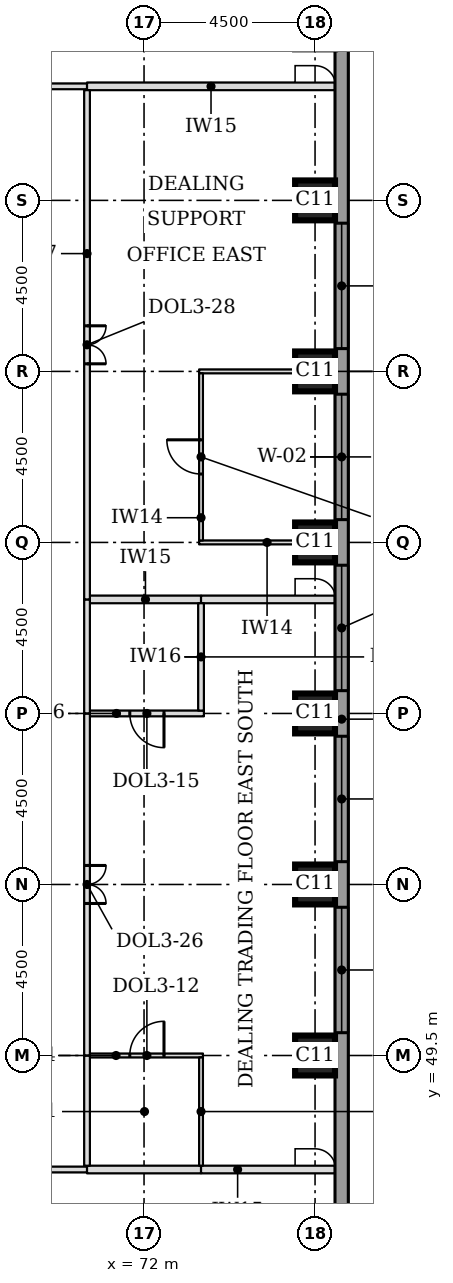
"""IFC4 building model, lengths in metres.
Left out: names, types, materials, properties, quantities, classifications, styles, units other than length and angle.
Written with IfcOpenShell. Run it as: python <this file> out.ifc"""

import sys

from ifc_helpers import new_model, si_unit, direction, frame, frame_2d, origin, origin_2d, place, context, subcontext, project, spatial, rectangle, extrude, element, fill, save


model = new_model("IFC4")
c1 = context("Model", 3, precision=1e-05, world=origin(), true_north=direction((0.0, 1.0)))
c2 = subcontext(c1, "Body", "Model", "MODEL_VIEW")
j1 = project(units=[si_unit("LENGTHUNIT", "METRE"), si_unit("PLANEANGLEUNIT", "RADIAN")], contexts=[c1])
p1 = place(None, origin())
s1 = spatial("IfcSite", under=j1, at=p1, CompositionType="ELEMENT")
p2 = place(p1, origin())
s2 = spatial("IfcBuilding", under=s1, at=p2, CompositionType="ELEMENT")
p3 = place(p2, frame((0.0, 0.0, 93.7)))
s3 = spatial("IfcBuildingStorey", under=s2, at=p3, CompositionType="ELEMENT", Elevation=93.7)
for number, where, z_axis, x_axis in (
    (1, (76.5, 49.5, 0.0), (0.0, 0.0, 1.0), (1.0, 0.0, 0.0)),
    (2, (76.5, 54.0, 0.0), (0.0, 0.0, 1.0), (1.0, 0.0, 0.0)),
    (3, (76.5, 58.5, 0.0), (0.0, 0.0, 1.0), (1.0, 0.0, 0.0)),
    (4, (76.5, 63.0, 0.0), (0.0, 0.0, 1.0), (1.0, 0.0, 0.0)),
    (5, (76.5, 67.5, 0.0), (0.0, 0.0, 1.0), (1.0, 0.0, 0.0)),
    (6, (76.5, 72.0, 0.0), (0.0, 0.0, 1.0), (1.0, 0.0, 0.0)),
):
    element("IfcColumn", number, at=place(p3, frame(where, z_axis=z_axis, x_axis=x_axis)), inside=s3, PredefinedType="COLUMN", context=c2, shape_type="SweptSolid", body=[
        extrude(rectangle(XDim=1.05, YDim=1.05, at=origin_2d()), origin(), (0.0, 0.0, 1.0), 3.7),
    ])
p4 = place(p3, frame((77.2, 44.638, 0.0), z_axis=(0.0, 0.0, 1.0), x_axis=(0.0, 1.0, 0.0)))
e7 = element("IfcWall", 7, at=p4, inside=s3, PredefinedType="STANDARD", context=c2, shape_type="SweptSolid", body=[
    extrude(rectangle(XDim=32.225, YDim=0.35, at=frame_2d((16.112, 0.0))), origin(), (0.0, 0.0, 1.0), 3.525),
])
p5 = place(p4, frame((5.462, 0.0, 0.9)))
e8 = element("IfcOpeningElement", 8, at=p5, cuts=e7, PredefinedType="OPENING", context=c2, shape_type="SweptSolid", body=[
    extrude(rectangle(XDim=3.3, YDim=1.9, at=frame_2d((1.65, 0.95))), frame((0.0, 0.185, 0.0), z_axis=(0.0, -1.0, 0.0), x_axis=(1.0, 0.0, 0.0)), (0.0, 0.0, 1.0), 0.37),
])
p6 = place(p4, frame((9.962, 0.0, 0.9)))
e9 = element("IfcOpeningElement", 9, at=p6, cuts=e7, PredefinedType="OPENING", context=c2, shape_type="SweptSolid", body=[
    extrude(rectangle(XDim=3.3, YDim=1.9, at=frame_2d((1.65, 0.95))), frame((0.0, 0.185, 0.0), z_axis=(0.0, -1.0, 0.0), x_axis=(1.0, 0.0, 0.0)), (0.0, 0.0, 1.0), 0.37),
])
p7 = place(p4, frame((14.462, 0.0, 0.9)))
e10 = element("IfcOpeningElement", 10, at=p7, cuts=e7, PredefinedType="OPENING", context=c2, shape_type="SweptSolid", body=[
    extrude(rectangle(XDim=3.3, YDim=1.9, at=frame_2d((1.65, 0.95))), frame((0.0, 0.185, 0.0), z_axis=(0.0, -1.0, 0.0), x_axis=(1.0, 0.0, 0.0)), (0.0, 0.0, 1.0), 0.37),
])
p8 = place(p4, frame((18.962, 0.0, 0.9)))
e11 = element("IfcOpeningElement", 11, at=p8, cuts=e7, PredefinedType="OPENING", context=c2, shape_type="SweptSolid", body=[
    extrude(rectangle(XDim=3.3, YDim=1.9, at=frame_2d((1.65, 0.95))), frame((0.0, 0.185, 0.0), z_axis=(0.0, -1.0, 0.0), x_axis=(1.0, 0.0, 0.0)), (0.0, 0.0, 1.0), 0.37),
])
p9 = place(p4, frame((23.462, 0.0, 0.9)))
e12 = element("IfcOpeningElement", 12, at=p9, cuts=e7, PredefinedType="OPENING", context=c2, shape_type="SweptSolid", body=[
    extrude(rectangle(XDim=3.3, YDim=1.9, at=frame_2d((1.65, 0.95))), frame((0.0, 0.185, 0.0), z_axis=(0.0, -1.0, 0.0), x_axis=(1.0, 0.0, 0.0)), (0.0, 0.0, 1.0), 0.37),
])
p10 = place(p3, frame((54.0, 46.5, 0.0), z_axis=(0.0, 0.0, 1.0), x_axis=(1.0, 0.0, 0.0)))
e13 = element("IfcWall", 13, at=p10, inside=s3, PredefinedType="PARTITIONING", context=c2, shape_type="SweptSolid", body=[
    extrude(rectangle(XDim=16.5, YDim=0.15, at=frame_2d((8.25, 0.0))), origin(), (0.0, 0.0, 1.0), 3.55),
])
p11 = place(p3, frame((70.5, 46.5, 0.0), z_axis=(0.0, 0.0, 1.0), x_axis=(1.0, 0.0, 0.0)))
e14 = element("IfcWall", 14, at=p11, inside=s3, PredefinedType="PARTITIONING", context=c2, shape_type="SweptSolid", body=[
    extrude(rectangle(XDim=3.0, YDim=0.2, at=frame_2d((1.5, 0.0))), origin(), (0.0, 0.0, 1.0), 3.55),
])
p12 = place(p3, frame((73.5, 46.5, 0.0), z_axis=(0.0, 0.0, 1.0), x_axis=(1.0, 0.0, 0.0)))
e15 = element("IfcWall", 15, at=p12, inside=s3, PredefinedType="PARTITIONING", context=c2, shape_type="SweptSolid", body=[
    extrude(rectangle(XDim=3.525, YDim=0.2, at=frame_2d((1.762, 0.0))), origin(), (0.0, 0.0, 1.0), 3.55),
])
p13 = place(p3, frame((70.575, 49.5, 0.0), z_axis=(0.0, 0.0, 1.0), x_axis=(1.0, 0.0, 0.0)))
e16 = element("IfcWall", 16, at=p13, inside=s3, PredefinedType="PARTITIONING", context=c2, shape_type="SweptSolid", body=[
    extrude(rectangle(XDim=2.975, YDim=0.1, at=frame_2d((1.488, 0.0))), origin(), (0.0, 0.0, 1.0), 3.55),
])
p14 = place(p13, frame((1.05, 0.0, 0.0)))
e17 = element("IfcOpeningElement", 17, at=p14, cuts=e16, PredefinedType="OPENING", context=c2, shape_type="SweptSolid", body=[
    extrude(rectangle(XDim=0.9, YDim=2.1, at=frame_2d((0.45, 1.05))), frame((0.0, 0.06, 0.0), z_axis=(0.0, -1.0, 0.0), x_axis=(1.0, 0.0, 0.0)), (0.0, 0.0, 1.0), 0.12),
])
p15 = place(p3, frame((70.575, 58.5, 0.0), z_axis=(0.0, 0.0, 1.0), x_axis=(1.0, 0.0, 0.0)))
e18 = element("IfcWall", 18, at=p15, inside=s3, PredefinedType="PARTITIONING", context=c2, shape_type="SweptSolid", body=[
    extrude(rectangle(XDim=3.0, YDim=0.15, at=frame_2d((1.5, 0.0))), origin(), (0.0, 0.0, 1.0), 3.55),
])
p16 = place(p15, frame((1.05, 0.0, 0.0)))
e19 = element("IfcOpeningElement", 19, at=p16, cuts=e18, PredefinedType="OPENING", context=c2, shape_type="SweptSolid", body=[
    extrude(rectangle(XDim=0.9, YDim=2.1, at=frame_2d((0.45, 1.05))), frame((0.0, 0.085, 0.0), z_axis=(0.0, -1.0, 0.0), x_axis=(1.0, 0.0, 0.0)), (0.0, 0.0, 1.0), 0.17),
])
p17 = place(p3, frame((70.575, 61.5, 0.0), z_axis=(0.0, 0.0, 1.0), x_axis=(1.0, 0.0, 0.0)))
e20 = element("IfcWall", 20, at=p17, inside=s3, PredefinedType="PARTITIONING", context=c2, shape_type="SweptSolid", body=[
    extrude(rectangle(XDim=2.925, YDim=0.2, at=frame_2d((1.462, 0.0))), origin(), (0.0, 0.0, 1.0), 3.55),
])
p18 = place(p3, frame((73.5, 61.5, 0.0), z_axis=(0.0, 0.0, 1.0), x_axis=(1.0, 0.0, 0.0)))
e21 = element("IfcWall", 21, at=p18, inside=s3, PredefinedType="PARTITIONING", context=c2, shape_type="SweptSolid", body=[
    extrude(rectangle(XDim=3.525, YDim=0.2, at=frame_2d((1.762, 0.0))), origin(), (0.0, 0.0, 1.0), 3.55),
])
for number, where, z_axis, x_axis in (
    (22, (73.45, 63.0, 0.0), (0.0, 0.0, 1.0), (1.0, 0.0, 0.0)),
    (23, (73.45, 67.5, 0.0), (0.0, 0.0, 1.0), (1.0, 0.0, 0.0)),
):
    element("IfcWall", number, at=place(p3, frame(where, z_axis=z_axis, x_axis=x_axis)), inside=s3, PredefinedType="PARTITIONING", context=c2, shape_type="SweptSolid", body=[
        extrude(rectangle(XDim=3.575, YDim=0.1, at=frame_2d((1.788, 0.0))), origin(), (0.0, 0.0, 1.0), 3.55),
    ])
p19 = place(p3, frame((49.5, 75.0, 0.0), z_axis=(0.0, 0.0, 1.0), x_axis=(1.0, 0.0, 0.0)))
e24 = element("IfcWall", 24, at=p19, inside=s3, PredefinedType="PARTITIONING", context=c2, shape_type="SweptSolid", body=[
    extrude(rectangle(XDim=21.0, YDim=0.15, at=frame_2d((10.5, 0.0))), origin(), (0.0, 0.0, 1.0), 3.55),
])
p20 = place(p19, frame((10.0, 0.0, 0.0)))
e25 = element("IfcOpeningElement", 25, at=p20, cuts=e24, PredefinedType="OPENING", context=c2, shape_type="SweptSolid", body=[
    extrude(rectangle(XDim=1.0, YDim=2.1, at=frame_2d((0.5, 1.05))), frame((0.0, 0.085, 0.0), z_axis=(0.0, -1.0, 0.0), x_axis=(1.0, 0.0, 0.0)), (0.0, 0.0, 1.0), 0.17),
])
p21 = place(p3, frame((70.5, 75.0, 0.0), z_axis=(0.0, 0.0, 1.0), x_axis=(1.0, 0.0, 0.0)))
e26 = element("IfcWall", 26, at=p21, inside=s3, PredefinedType="PARTITIONING", context=c2, shape_type="SweptSolid", body=[
    extrude(rectangle(XDim=6.525, YDim=0.2, at=frame_2d((3.262, 0.0))), origin(), (0.0, 0.0, 1.0), 3.55),
])
p22 = place(p3, frame((70.5, 46.6, 0.0), z_axis=(0.0, 0.0, 1.0), x_axis=(0.0, 1.0, 0.0)))
e27 = element("IfcWall", 27, at=p22, inside=s3, PredefinedType="PARTITIONING", context=c2, shape_type="SweptSolid", body=[
    extrude(rectangle(XDim=2.9, YDim=0.15, at=frame_2d((1.45, 0.0))), origin(), (0.0, 0.0, 1.0), 3.55),
])
p23 = place(p3, frame((73.5, 46.6, 0.0), z_axis=(0.0, 0.0, 1.0), x_axis=(0.0, 1.0, 0.0)))
e28 = element("IfcWall", 28, at=p23, inside=s3, PredefinedType="PARTITIONING", context=c2, shape_type="SweptSolid", body=[
    extrude(rectangle(XDim=2.85, YDim=0.1, at=frame_2d((1.425, 0.0))), origin(), (0.0, 0.0, 1.0), 3.55),
])
p24 = place(p3, frame((70.5, 49.5, 0.0), z_axis=(0.0, 0.0, 1.0), x_axis=(0.0, 1.0, 0.0)))
e29 = element("IfcWall", 29, at=p24, inside=s3, PredefinedType="PARTITIONING", context=c2, shape_type="SweptSolid", body=[
    extrude(rectangle(XDim=9.0, YDim=0.15, at=frame_2d((4.5, 0.0))), origin(), (0.0, 0.0, 1.0), 3.55),
])
p25 = place(p24, frame((4.0, 0.0, 0.0)))
e30 = element("IfcOpeningElement", 30, at=p25, cuts=e29, PredefinedType="OPENING", context=c2, shape_type="SweptSolid", body=[
    extrude(rectangle(XDim=1.0, YDim=2.1, at=frame_2d((0.5, 1.05))), frame((0.0, 0.085, 0.0), z_axis=(0.0, -1.0, 0.0), x_axis=(1.0, 0.0, 0.0)), (0.0, 0.0, 1.0), 0.17),
])
p26 = place(p3, frame((70.5, 58.5, 0.0), z_axis=(0.0, 0.0, 1.0), x_axis=(0.0, 1.0, 0.0)))
e31 = element("IfcWall", 31, at=p26, inside=s3, PredefinedType="PARTITIONING", context=c2, shape_type="SweptSolid", body=[
    extrude(rectangle(XDim=3.0, YDim=0.15, at=frame_2d((1.5, 0.0))), origin(), (0.0, 0.0, 1.0), 3.55),
])
p27 = place(p3, frame((73.5, 58.575, 0.0), z_axis=(0.0, 0.0, 1.0), x_axis=(0.0, 1.0, 0.0)))
e32 = element("IfcWall", 32, at=p27, inside=s3, PredefinedType="PARTITIONING", context=c2, shape_type="SweptSolid", body=[
    extrude(rectangle(XDim=2.825, YDim=0.15, at=frame_2d((1.413, 0.0))), origin(), (0.0, 0.0, 1.0), 3.55),
])
p28 = place(p3, frame((70.5, 61.5, 0.0), z_axis=(0.0, 0.0, 1.0), x_axis=(0.0, 1.0, 0.0)))
e33 = element("IfcWall", 33, at=p28, inside=s3, PredefinedType="PARTITIONING", context=c2, shape_type="SweptSolid", body=[
    extrude(rectangle(XDim=13.4, YDim=0.15, at=frame_2d((6.7, 0.0))), origin(), (0.0, 0.0, 1.0), 3.55),
])
p29 = place(p28, frame((6.2, 0.0, 0.0)))
e34 = element("IfcOpeningElement", 34, at=p29, cuts=e33, PredefinedType="OPENING", context=c2, shape_type="SweptSolid", body=[
    extrude(rectangle(XDim=1.0, YDim=2.1, at=frame_2d((0.5, 1.05))), frame((0.0, 0.085, 0.0), z_axis=(0.0, -1.0, 0.0), x_axis=(1.0, 0.0, 0.0)), (0.0, 0.0, 1.0), 0.17),
])
p30 = place(p3, frame((73.5, 63.05, 0.0), z_axis=(0.0, 0.0, 1.0), x_axis=(0.0, 1.0, 0.0)))
e35 = element("IfcWall", 35, at=p30, inside=s3, PredefinedType="PARTITIONING", context=c2, shape_type="SweptSolid", body=[
    extrude(rectangle(XDim=4.4, YDim=0.1, at=frame_2d((2.2, 0.0))), origin(), (0.0, 0.0, 1.0), 3.55),
])
p31 = place(p30, frame((1.75, 0.0, 0.0)))
e36 = element("IfcOpeningElement", 36, at=p31, cuts=e35, PredefinedType="OPENING", context=c2, shape_type="SweptSolid", body=[
    extrude(rectangle(XDim=0.9, YDim=2.1, at=frame_2d((0.45, 1.05))), frame((0.0, 0.06, 0.0), z_axis=(0.0, -1.0, 0.0), x_axis=(1.0, 0.0, 0.0)), (0.0, 0.0, 1.0), 0.12),
])
p32 = place(p5, origin())
e37 = element("IfcWindow", 37, at=p32, inside=s3, PartitioningType="SINGLE_PANEL", PredefinedType="WINDOW", context=c2, shape_type="SweptSolid", body=[
    extrude(rectangle(XDim=3.3, YDim=1.9, at=frame_2d((1.65, 0.95))), frame((0.0, 0.085, 0.0), z_axis=(0.0, -1.0, 0.0), x_axis=(1.0, 0.0, 0.0)), (0.0, 0.0, 1.0), 0.06),
])
fill(e8, e37)
p33 = place(p6, origin())
e38 = element("IfcWindow", 38, at=p33, inside=s3, PartitioningType="SINGLE_PANEL", PredefinedType="WINDOW", context=c2, shape_type="SweptSolid", body=[
    extrude(rectangle(XDim=3.3, YDim=1.9, at=frame_2d((1.65, 0.95))), frame((0.0, 0.085, 0.0), z_axis=(0.0, -1.0, 0.0), x_axis=(1.0, 0.0, 0.0)), (0.0, 0.0, 1.0), 0.06),
])
fill(e9, e38)
p34 = place(p7, origin())
e39 = element("IfcWindow", 39, at=p34, inside=s3, PartitioningType="SINGLE_PANEL", PredefinedType="WINDOW", context=c2, shape_type="SweptSolid", body=[
    extrude(rectangle(XDim=3.3, YDim=1.9, at=frame_2d((1.65, 0.95))), frame((0.0, 0.085, 0.0), z_axis=(0.0, -1.0, 0.0), x_axis=(1.0, 0.0, 0.0)), (0.0, 0.0, 1.0), 0.06),
])
fill(e10, e39)
p35 = place(p8, origin())
e40 = element("IfcWindow", 40, at=p35, inside=s3, PartitioningType="SINGLE_PANEL", PredefinedType="WINDOW", context=c2, shape_type="SweptSolid", body=[
    extrude(rectangle(XDim=3.3, YDim=1.9, at=frame_2d((1.65, 0.95))), frame((0.0, 0.085, 0.0), z_axis=(0.0, -1.0, 0.0), x_axis=(1.0, 0.0, 0.0)), (0.0, 0.0, 1.0), 0.06),
])
fill(e11, e40)
p36 = place(p9, origin())
e41 = element("IfcWindow", 41, at=p36, inside=s3, PartitioningType="SINGLE_PANEL", PredefinedType="WINDOW", context=c2, shape_type="SweptSolid", body=[
    extrude(rectangle(XDim=3.3, YDim=1.9, at=frame_2d((1.65, 0.95))), frame((0.0, 0.085, 0.0), z_axis=(0.0, -1.0, 0.0), x_axis=(1.0, 0.0, 0.0)), (0.0, 0.0, 1.0), 0.06),
])
fill(e12, e41)
p37 = place(p25, frame((1.0, 0.0, 0.0), z_axis=(0.0, 0.0, 1.0), x_axis=(-1.0, 0.0, 0.0)))
e42 = element("IfcDoor", 42, at=p37, inside=s3, OperationType="DOUBLE_DOOR_SINGLE_SWING", PredefinedType="DOOR", context=c2, shape_type="SweptSolid", body=[
    extrude(rectangle(XDim=1.0, YDim=2.1, at=frame_2d((0.5, 1.05))), frame((0.0, 0.025, 0.0), z_axis=(0.0, -1.0, 0.0), x_axis=(1.0, 0.0, 0.0)), (0.0, 0.0, 1.0), 0.05),
])
fill(e30, e42)
p38 = place(p16, frame((0.9, 0.0, 0.0), z_axis=(0.0, 0.0, 1.0), x_axis=(-1.0, 0.0, 0.0)))
e43 = element("IfcDoor", 43, at=p38, inside=s3, OperationType="SINGLE_SWING_LEFT", PredefinedType="DOOR", context=c2, shape_type="SweptSolid", body=[
    extrude(rectangle(XDim=0.9, YDim=2.1, at=frame_2d((0.45, 1.05))), frame((0.0, 0.025, 0.0), z_axis=(0.0, -1.0, 0.0), x_axis=(1.0, 0.0, 0.0)), (0.0, 0.0, 1.0), 0.05),
])
fill(e19, e43)
p39 = place(p14, origin())
e44 = element("IfcDoor", 44, at=p39, inside=s3, OperationType="SINGLE_SWING_RIGHT", PredefinedType="DOOR", context=c2, shape_type="SweptSolid", body=[
    extrude(rectangle(XDim=0.9, YDim=2.1, at=frame_2d((0.45, 1.05))), frame((0.0, 0.025, 0.0), z_axis=(0.0, -1.0, 0.0), x_axis=(1.0, 0.0, 0.0)), (0.0, 0.0, 1.0), 0.05),
])
fill(e17, e44)
p40 = place(p29, frame((1.0, 0.0, 0.0), z_axis=(0.0, 0.0, 1.0), x_axis=(-1.0, 0.0, 0.0)))
e45 = element("IfcDoor", 45, at=p40, inside=s3, OperationType="DOUBLE_DOOR_SINGLE_SWING", PredefinedType="DOOR", context=c2, shape_type="SweptSolid", body=[
    extrude(rectangle(XDim=1.0, YDim=2.1, at=frame_2d((0.5, 1.05))), frame((0.0, 0.025, 0.0), z_axis=(0.0, -1.0, 0.0), x_axis=(1.0, 0.0, 0.0)), (0.0, 0.0, 1.0), 0.05),
])
fill(e34, e45)
p41 = place(p31, origin())
e46 = element("IfcDoor", 46, at=p41, inside=s3, OperationType="SINGLE_SWING_RIGHT", PredefinedType="DOOR", context=c2, shape_type="SweptSolid", body=[
    extrude(rectangle(XDim=0.9, YDim=2.1, at=frame_2d((0.45, 1.05))), frame((0.0, 0.025, 0.0), z_axis=(0.0, -1.0, 0.0), x_axis=(1.0, 0.0, 0.0)), (0.0, 0.0, 1.0), 0.05),
])
fill(e36, e46)
save(model, sys.argv[1])
